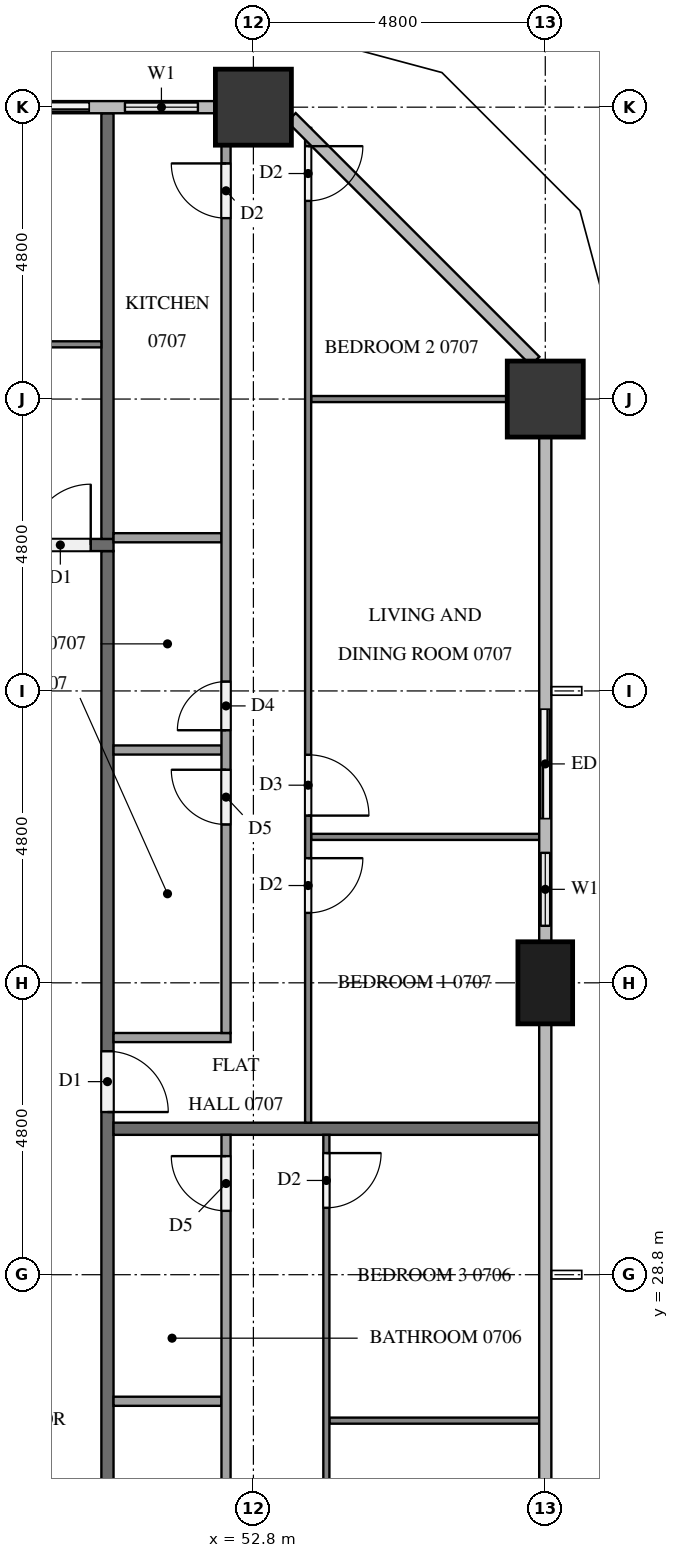
"""IFC4 building model, lengths in metres.
Left out: names, types, materials, properties, quantities, classifications, styles, units other than length and angle.
Written with IfcOpenShell. Run it as: python <this file> out.ifc"""

import sys

from ifc_helpers import new_model, si_unit, direction, frame, frame_2d, origin, origin_2d, place, context, subcontext, project, spatial, rectangle, extrude, element, fill, save


model = new_model("IFC4")
c1 = context("Model", 3, precision=1e-05, world=origin(), true_north=direction((0.0, 1.0)))
c2 = subcontext(c1, "Body", "Model", "MODEL_VIEW")
j1 = project(units=[si_unit("LENGTHUNIT", "METRE"), si_unit("PLANEANGLEUNIT", "RADIAN")], contexts=[c1])
p1 = place(None, origin())
s1 = spatial("IfcSite", under=j1, at=p1, CompositionType="ELEMENT")
p2 = place(p1, origin())
s2 = spatial("IfcBuilding", under=s1, at=p2, CompositionType="ELEMENT")
p3 = place(p2, frame((0.0, 0.0, 32.9)))
s3 = spatial("IfcBuildingStorey", under=s2, at=p3, CompositionType="ELEMENT", Elevation=32.9)
p4 = place(p3, frame((57.6, 33.6, 0.0), z_axis=(0.0, 0.0, 1.0), x_axis=(0.0, 1.0, 0.0)))
e1 = element("IfcColumn", 1, at=p4, inside=s3, PredefinedType="COLUMN", context=c2, shape_type="SweptSolid", body=[
    extrude(rectangle(XDim=1.35, YDim=0.9, at=origin_2d()), origin(), (0.0, 0.0, 1.0), 3.2),
])
for number, where, z_axis, x_axis in (
    (2, (57.6, 43.2, 0.0), (0.0, 0.0, 1.0), (1.0, 0.0, 0.0)),
    (3, (52.8, 48.0, 0.0), (0.0, 0.0, 1.0), (1.0, 0.0, 0.0)),
):
    element("IfcColumn", number, at=place(p3, frame(where, z_axis=z_axis, x_axis=x_axis)), inside=s3, PredefinedType="COLUMN", context=c2, shape_type="SweptSolid", body=[
        extrude(rectangle(XDim=1.25, YDim=1.25, at=origin_2d()), origin(), (0.0, 0.0, 1.0), 3.2),
    ])
p5 = place(p3, frame((57.6, 34.275, 0.0), z_axis=(0.0, 0.0, 1.0), x_axis=(0.0, 1.0, 0.0)))
e4 = element("IfcWall", 4, at=p5, inside=s3, PredefinedType="SOLIDWALL", context=c2, shape_type="SweptSolid", body=[
    extrude(rectangle(XDim=4.125, YDim=0.15, at=frame_2d((2.062, 0.0))), origin(), (0.0, 0.0, 1.0), 3.2),
])
p6 = place(p5, frame((0.262, 0.0, 0.9)))
e5 = element("IfcOpeningElement", 5, at=p6, cuts=e4, PredefinedType="OPENING", context=c2, shape_type="SweptSolid", body=[
    extrude(rectangle(XDim=1.2, YDim=1.4, at=frame_2d((0.6, 0.7))), frame((0.0, 0.085, 0.0), z_axis=(0.0, -1.0, 0.0), x_axis=(1.0, 0.0, 0.0)), (0.0, 0.0, 1.0), 0.17),
])
p7 = place(p5, frame((2.025, 0.0, 0.0)))
e6 = element("IfcOpeningElement", 6, at=p7, cuts=e4, PredefinedType="OPENING", context=c2, shape_type="SweptSolid", body=[
    extrude(rectangle(XDim=1.8, YDim=2.4, at=frame_2d((0.9, 1.2))), frame((0.0, 0.085, 0.0), z_axis=(0.0, -1.0, 0.0), x_axis=(1.0, 0.0, 0.0)), (0.0, 0.0, 1.0), 0.17),
])
p8 = place(p3, frame((52.175, 48.0, 0.0), z_axis=(0.0, 0.0, 1.0), x_axis=(-1.0, 0.0, 0.0)))
e7 = element("IfcWall", 7, at=p8, inside=s3, PredefinedType="SOLIDWALL", context=c2, shape_type="SweptSolid", body=[
    extrude(rectangle(XDim=4.175, YDim=0.15, at=frame_2d((2.087, 0.0))), origin(), (0.0, 0.0, 1.0), 3.2),
])
p9 = place(p8, frame((0.288, 0.0, 0.9)))
e8 = element("IfcOpeningElement", 8, at=p9, cuts=e7, PredefinedType="OPENING", context=c2, shape_type="SweptSolid", body=[
    extrude(rectangle(XDim=1.2, YDim=1.4, at=frame_2d((0.6, 0.7))), frame((0.0, 0.085, 0.0), z_axis=(0.0, -1.0, 0.0), x_axis=(1.0, 0.0, 0.0)), (0.0, 0.0, 1.0), 0.17),
])
p10 = place(p8, frame((2.075, 0.0, 0.0)))
e9 = element("IfcOpeningElement", 9, at=p10, cuts=e7, PredefinedType="OPENING", context=c2, shape_type="SweptSolid", body=[
    extrude(rectangle(XDim=1.8, YDim=2.4, at=frame_2d((0.9, 1.2))), frame((0.0, 0.085, 0.0), z_axis=(0.0, -1.0, 0.0), x_axis=(1.0, 0.0, 0.0)), (0.0, 0.0, 1.0), 0.17),
])
p11 = place(p3, frame((50.4, 40.7, 0.0), z_axis=(0.0, 0.0, 1.0), x_axis=(0.0, -1.0, 0.0)))
e10 = element("IfcWall", 10, at=p11, inside=s3, PredefinedType="PARTITIONING", context=c2, shape_type="SweptSolid", body=[
    extrude(rectangle(XDim=28.6, YDim=0.2, at=frame_2d((14.3, 0.0))), origin(), (0.0, 0.0, 1.0), 3.2),
])
p12 = place(p11, frame((27.375, 0.0, 0.0)))
e11 = element("IfcOpeningElement", 11, at=p12, cuts=e10, PredefinedType="OPENING", context=c2, shape_type="SweptSolid", body=[
    extrude(rectangle(XDim=1.1, YDim=2.1, at=frame_2d((0.55, 1.05))), frame((0.0, 0.11, 0.0), z_axis=(0.0, -1.0, 0.0), x_axis=(1.0, 0.0, 0.0)), (0.0, 0.0, 1.0), 0.22),
])
p13 = place(p11, frame((8.225, 0.0, 0.0)))
e12 = element("IfcOpeningElement", 12, at=p13, cuts=e10, PredefinedType="OPENING", context=c2, shape_type="SweptSolid", body=[
    extrude(rectangle(XDim=1.0, YDim=2.1, at=frame_2d((0.5, 1.05))), frame((0.0, 0.11, 0.0), z_axis=(0.0, -1.0, 0.0), x_axis=(1.0, 0.0, 0.0)), (0.0, 0.0, 1.0), 0.22),
])
p14 = place(p3, frame((11.9, 40.8, 0.0), z_axis=(0.0, 0.0, 1.0), x_axis=(1.0, 0.0, 0.0)))
e13 = element("IfcWall", 13, at=p14, inside=s3, PredefinedType="PARTITIONING", context=c2, shape_type="SweptSolid", body=[
    extrude(rectangle(XDim=38.6, YDim=0.2, at=frame_2d((19.3, 0.0))), origin(), (0.0, 0.0, 1.0), 3.2),
])
p15 = place(p14, frame((37.225, 0.0, 0.0)))
e14 = element("IfcOpeningElement", 14, at=p15, cuts=e13, PredefinedType="OPENING", context=c2, shape_type="SweptSolid", body=[
    extrude(rectangle(XDim=1.0, YDim=2.1, at=frame_2d((0.5, 1.05))), frame((0.0, 0.11, 0.0), z_axis=(0.0, -1.0, 0.0), x_axis=(1.0, 0.0, 0.0)), (0.0, 0.0, 1.0), 0.22),
])
p16 = place(p14, frame((30.025, 0.0, 0.0)))
e15 = element("IfcOpeningElement", 15, at=p16, cuts=e13, PredefinedType="OPENING", context=c2, shape_type="SweptSolid", body=[
    extrude(rectangle(XDim=1.0, YDim=2.1, at=frame_2d((0.5, 1.05))), frame((0.0, 0.11, 0.0), z_axis=(0.0, -1.0, 0.0), x_axis=(1.0, 0.0, 0.0)), (0.0, 0.0, 1.0), 0.22),
])
p17 = place(p14, frame((2.725, 0.0, 0.0)))
e16 = element("IfcOpeningElement", 16, at=p17, cuts=e13, PredefinedType="OPENING", context=c2, shape_type="SweptSolid", body=[
    extrude(rectangle(XDim=1.1, YDim=2.1, at=frame_2d((0.55, 1.05))), frame((0.0, 0.11, 0.0), z_axis=(0.0, -1.0, 0.0), x_axis=(1.0, 0.0, 0.0)), (0.0, 0.0, 1.0), 0.22),
])
p18 = place(p14, frame((1.225, 0.0, 0.0)))
e17 = element("IfcOpeningElement", 17, at=p18, cuts=e13, PredefinedType="OPENING", context=c2, shape_type="SweptSolid", body=[
    extrude(rectangle(XDim=1.0, YDim=2.1, at=frame_2d((0.5, 1.05))), frame((0.0, 0.11, 0.0), z_axis=(0.0, -1.0, 0.0), x_axis=(1.0, 0.0, 0.0)), (0.0, 0.0, 1.0), 0.22),
])
for number, where, z_axis, x_axis in (
    (18, (50.5, 31.2, 0.0), (0.0, 0.0, 1.0), (1.0, 0.0, 0.0)),
    (19, (50.4, 40.9, 0.0), (0.0, 0.0, 1.0), (0.0, 1.0, 0.0)),
):
    element("IfcWall", number, at=place(p3, frame(where, z_axis=z_axis, x_axis=x_axis)), inside=s3, PredefinedType="PARTITIONING", context=c2, shape_type="SweptSolid", body=[
        extrude(rectangle(XDim=7.0, YDim=0.2, at=frame_2d((3.5, 0.0))), origin(), (0.0, 0.0, 1.0), 3.2),
    ])
p19 = place(p3, frame((54.05, 26.4, 0.0), z_axis=(0.0, 0.0, 1.0), x_axis=(1.0, 0.0, 0.0)))
e20 = element("IfcWall", 20, at=p19, inside=s3, PredefinedType="PARTITIONING", context=c2, shape_type="SweptSolid", body=[
    extrude(rectangle(XDim=3.45, YDim=0.1, at=frame_2d((1.725, 0.0))), origin(), (0.0, 0.0, 1.0), 3.2),
])
p20 = place(p3, frame((54.0, 31.1, 0.0), z_axis=(0.0, 0.0, 1.0), x_axis=(0.0, -1.0, 0.0)))
e21 = element("IfcWall", 21, at=p20, inside=s3, PredefinedType="PARTITIONING", context=c2, shape_type="SweptSolid", body=[
    extrude(rectangle(XDim=19.0, YDim=0.1, at=frame_2d((9.5, 0.0))), origin(), (0.0, 0.0, 1.0), 3.2),
])
p21 = place(p20, frame((17.8, 0.0, 0.0)))
e22 = element("IfcOpeningElement", 22, at=p21, cuts=e21, PredefinedType="OPENING", context=c2, shape_type="SweptSolid", body=[
    extrude(rectangle(XDim=0.9, YDim=2.1, at=frame_2d((0.45, 1.05))), frame((0.0, 0.06, 0.0), z_axis=(0.0, -1.0, 0.0), x_axis=(1.0, 0.0, 0.0)), (0.0, 0.0, 1.0), 0.12),
])
p22 = place(p20, frame((9.85, 0.0, 0.0)))
e23 = element("IfcOpeningElement", 23, at=p22, cuts=e21, PredefinedType="OPENING", context=c2, shape_type="SweptSolid", body=[
    extrude(rectangle(XDim=0.9, YDim=2.1, at=frame_2d((0.45, 1.05))), frame((0.0, 0.06, 0.0), z_axis=(0.0, -1.0, 0.0), x_axis=(1.0, 0.0, 0.0)), (0.0, 0.0, 1.0), 0.12),
])
p23 = place(p20, frame((8.15, 0.0, 0.0)))
e24 = element("IfcOpeningElement", 24, at=p23, cuts=e21, PredefinedType="OPENING", context=c2, shape_type="SweptSolid", body=[
    extrude(rectangle(XDim=1.0, YDim=2.1, at=frame_2d((0.5, 1.05))), frame((0.0, 0.06, 0.0), z_axis=(0.0, -1.0, 0.0), x_axis=(1.0, 0.0, 0.0)), (0.0, 0.0, 1.0), 0.12),
])
p24 = place(p20, frame((0.3, 0.0, 0.0)))
e25 = element("IfcOpeningElement", 25, at=p24, cuts=e21, PredefinedType="OPENING", context=c2, shape_type="SweptSolid", body=[
    extrude(rectangle(XDim=0.9, YDim=2.1, at=frame_2d((0.45, 1.05))), frame((0.0, 0.06, 0.0), z_axis=(0.0, -1.0, 0.0), x_axis=(1.0, 0.0, 0.0)), (0.0, 0.0, 1.0), 0.12),
])
p25 = place(p3, frame((50.5, 26.719, 0.0), z_axis=(0.0, 0.0, 1.0), x_axis=(1.0, 0.0, 0.0)))
e26 = element("IfcWall", 26, at=p25, inside=s3, PredefinedType="PARTITIONING", context=c2, shape_type="SweptSolid", body=[
    extrude(rectangle(XDim=1.775, YDim=0.15, at=frame_2d((0.887, 0.0))), origin(), (0.0, 0.0, 1.0), 3.2),
])
p26 = place(p3, frame((52.35, 13.575, 0.0), z_axis=(0.0, 0.0, 1.0), x_axis=(0.0, 1.0, 0.0)))
e27 = element("IfcWall", 27, at=p26, inside=s3, PredefinedType="PARTITIONING", context=c2, shape_type="SweptSolid", body=[
    extrude(rectangle(XDim=17.525, YDim=0.15, at=frame_2d((8.763, 0.0))), origin(), (0.0, 0.0, 1.0), 3.2),
])
p27 = place(p26, frame((0.3, 0.0, 0.0)))
e28 = element("IfcOpeningElement", 28, at=p27, cuts=e27, PredefinedType="OPENING", context=c2, shape_type="SweptSolid", body=[
    extrude(rectangle(XDim=0.9, YDim=2.1, at=frame_2d((0.45, 1.05))), frame((0.0, 0.085, 0.0), z_axis=(0.0, -1.0, 0.0), x_axis=(1.0, 0.0, 0.0)), (0.0, 0.0, 1.0), 0.17),
])
p28 = place(p26, frame((8.733, 0.0, 0.0)))
e29 = element("IfcOpeningElement", 29, at=p28, cuts=e27, PredefinedType="OPENING", context=c2, shape_type="SweptSolid", body=[
    extrude(rectangle(XDim=0.8, YDim=2.1, at=frame_2d((0.4, 1.05))), frame((0.0, 0.085, 0.0), z_axis=(0.0, -1.0, 0.0), x_axis=(1.0, 0.0, 0.0)), (0.0, 0.0, 1.0), 0.17),
])
p29 = place(p26, frame((10.183, 0.0, 0.0)))
e30 = element("IfcOpeningElement", 30, at=p29, cuts=e27, PredefinedType="OPENING", context=c2, shape_type="SweptSolid", body=[
    extrude(rectangle(XDim=0.8, YDim=2.1, at=frame_2d((0.4, 1.05))), frame((0.0, 0.085, 0.0), z_axis=(0.0, -1.0, 0.0), x_axis=(1.0, 0.0, 0.0)), (0.0, 0.0, 1.0), 0.17),
])
p30 = place(p26, frame((16.275, 0.0, 0.0)))
e31 = element("IfcOpeningElement", 31, at=p30, cuts=e27, PredefinedType="OPENING", context=c2, shape_type="SweptSolid", body=[
    extrude(rectangle(XDim=0.9, YDim=2.1, at=frame_2d((0.45, 1.05))), frame((0.0, 0.085, 0.0), z_axis=(0.0, -1.0, 0.0), x_axis=(1.0, 0.0, 0.0)), (0.0, 0.0, 1.0), 0.17),
])
p31 = place(p3, frame((53.75, 36.0, 0.0), z_axis=(0.0, 0.0, 1.0), x_axis=(1.0, 0.0, 0.0)))
e32 = element("IfcWall", 32, at=p31, inside=s3, PredefinedType="PARTITIONING", context=c2, shape_type="SweptSolid", body=[
    extrude(rectangle(XDim=3.75, YDim=0.1, at=frame_2d((1.875, 0.0))), origin(), (0.0, 0.0, 1.0), 3.2),
])
p32 = place(p3, frame((53.75, 43.2, 0.0), z_axis=(0.0, 0.0, 1.0), x_axis=(1.0, 0.0, 0.0)))
e33 = element("IfcWall", 33, at=p32, inside=s3, PredefinedType="PARTITIONING", context=c2, shape_type="SweptSolid", body=[
    extrude(rectangle(XDim=3.225, YDim=0.1, at=frame_2d((1.613, 0.0))), origin(), (0.0, 0.0, 1.0), 3.2),
])
p33 = place(p3, frame((53.7, 47.659, 0.0), z_axis=(0.0, 0.0, 1.0), x_axis=(0.0, -1.0, 0.0)))
e34 = element("IfcWall", 34, at=p33, inside=s3, PredefinedType="PARTITIONING", context=c2, shape_type="SweptSolid", body=[
    extrude(rectangle(XDim=16.359, YDim=0.1, at=frame_2d((8.179, 0.0))), origin(), (0.0, 0.0, 1.0), 3.2),
])
p34 = place(p33, frame((12.009, 0.0, 0.0)))
e35 = element("IfcOpeningElement", 35, at=p34, cuts=e34, PredefinedType="OPENING", context=c2, shape_type="SweptSolid", body=[
    extrude(rectangle(XDim=0.9, YDim=2.1, at=frame_2d((0.45, 1.05))), frame((0.0, 0.06, 0.0), z_axis=(0.0, -1.0, 0.0), x_axis=(1.0, 0.0, 0.0)), (0.0, 0.0, 1.0), 0.12),
])
p35 = place(p33, frame((10.309, 0.0, 0.0)))
e36 = element("IfcOpeningElement", 36, at=p35, cuts=e34, PredefinedType="OPENING", context=c2, shape_type="SweptSolid", body=[
    extrude(rectangle(XDim=1.0, YDim=2.1, at=frame_2d((0.5, 1.05))), frame((0.0, 0.06, 0.0), z_axis=(0.0, -1.0, 0.0), x_axis=(1.0, 0.0, 0.0)), (0.0, 0.0, 1.0), 0.12),
])
p36 = place(p33, frame((0.3, 0.0, 0.0)))
e37 = element("IfcOpeningElement", 37, at=p36, cuts=e34, PredefinedType="OPENING", context=c2, shape_type="SweptSolid", body=[
    extrude(rectangle(XDim=0.9, YDim=2.1, at=frame_2d((0.45, 1.05))), frame((0.0, 0.06, 0.0), z_axis=(0.0, -1.0, 0.0), x_axis=(1.0, 0.0, 0.0)), (0.0, 0.0, 1.0), 0.12),
])
for number, where, z_axis, x_axis in (
    (38, (50.5, 37.429, 0.0), (0.0, 0.0, 1.0), (1.0, 0.0, 0.0)),
    (39, (50.5, 40.919, 0.0), (0.0, 0.0, 1.0), (1.0, 0.0, 0.0)),
):
    element("IfcWall", number, at=place(p3, frame(where, z_axis=z_axis, x_axis=x_axis)), inside=s3, PredefinedType="PARTITIONING", context=c2, shape_type="SweptSolid", body=[
        extrude(rectangle(XDim=1.775, YDim=0.15, at=frame_2d((0.887, 0.0))), origin(), (0.0, 0.0, 1.0), 3.2),
    ])
p37 = place(p3, frame((50.5, 32.7, 0.0), z_axis=(0.0, 0.0, 1.0), x_axis=(1.0, 0.0, 0.0)))
e40 = element("IfcWall", 40, at=p37, inside=s3, PredefinedType="PARTITIONING", context=c2, shape_type="SweptSolid", body=[
    extrude(rectangle(XDim=1.925, YDim=0.15, at=frame_2d((0.962, 0.0))), origin(), (0.0, 0.0, 1.0), 3.2),
])
p38 = place(p3, frame((52.35, 32.775, 0.0), z_axis=(0.0, 0.0, 1.0), x_axis=(0.0, 1.0, 0.0)))
e41 = element("IfcWall", 41, at=p38, inside=s3, PredefinedType="PARTITIONING", context=c2, shape_type="SweptSolid", body=[
    extrude(rectangle(XDim=14.6, YDim=0.15, at=frame_2d((7.3, 0.0))), origin(), (0.0, 0.0, 1.0), 3.2),
])
p39 = place(p38, frame((3.429, 0.0, 0.0)))
e42 = element("IfcOpeningElement", 42, at=p39, cuts=e41, PredefinedType="OPENING", context=c2, shape_type="SweptSolid", body=[
    extrude(rectangle(XDim=0.9, YDim=2.1, at=frame_2d((0.45, 1.05))), frame((0.0, 0.085, 0.0), z_axis=(0.0, -1.0, 0.0), x_axis=(1.0, 0.0, 0.0)), (0.0, 0.0, 1.0), 0.17),
])
p40 = place(p38, frame((4.979, 0.0, 0.0)))
e43 = element("IfcOpeningElement", 43, at=p40, cuts=e41, PredefinedType="OPENING", context=c2, shape_type="SweptSolid", body=[
    extrude(rectangle(XDim=0.8, YDim=2.1, at=frame_2d((0.4, 1.05))), frame((0.0, 0.085, 0.0), z_axis=(0.0, -1.0, 0.0), x_axis=(1.0, 0.0, 0.0)), (0.0, 0.0, 1.0), 0.17),
])
p41 = place(p38, frame((13.4, 0.0, 0.0)))
e44 = element("IfcOpeningElement", 44, at=p41, cuts=e41, PredefinedType="OPENING", context=c2, shape_type="SweptSolid", body=[
    extrude(rectangle(XDim=0.9, YDim=2.1, at=frame_2d((0.45, 1.05))), frame((0.0, 0.085, 0.0), z_axis=(0.0, -1.0, 0.0), x_axis=(1.0, 0.0, 0.0)), (0.0, 0.0, 1.0), 0.17),
])
p42 = place(p3, frame((43.3, 44.1, 0.0), z_axis=(0.0, 0.0, 1.0), x_axis=(1.0, 0.0, 0.0)))
e45 = element("IfcWall", 45, at=p42, inside=s3, PredefinedType="PARTITIONING", context=c2, shape_type="SweptSolid", body=[
    extrude(rectangle(XDim=7.0, YDim=0.1, at=frame_2d((3.5, 0.0))), origin(), (0.0, 0.0, 1.0), 3.2),
])
p43 = place(p42, frame((0.3, 0.0, 0.0)))
e46 = element("IfcOpeningElement", 46, at=p43, cuts=e45, PredefinedType="OPENING", context=c2, shape_type="SweptSolid", body=[
    extrude(rectangle(XDim=1.0, YDim=2.1, at=frame_2d((0.5, 1.05))), frame((0.0, 0.06, 0.0), z_axis=(0.0, -1.0, 0.0), x_axis=(1.0, 0.0, 0.0)), (0.0, 0.0, 1.0), 0.12),
])
p44 = place(p6, origin())
e47 = element("IfcWindow", 47, at=p44, inside=s3, PartitioningType="SINGLE_PANEL", PredefinedType="WINDOW", context=c2, shape_type="SweptSolid", body=[
    extrude(rectangle(XDim=1.2, YDim=1.4, at=frame_2d((0.6, 0.7))), frame((0.0, 0.03, 0.0), z_axis=(0.0, -1.0, 0.0), x_axis=(1.0, 0.0, 0.0)), (0.0, 0.0, 1.0), 0.06),
])
fill(e5, e47)
p45 = place(p7, origin())
e48 = element("IfcDoor", 48, at=p45, inside=s3, OperationType="SLIDING_TO_RIGHT", PredefinedType="DOOR", context=c2, shape_type="SweptSolid", body=[
    extrude(rectangle(XDim=1.8, YDim=2.4, at=frame_2d((0.9, 1.2))), frame((0.0, 0.025, 0.0), z_axis=(0.0, -1.0, 0.0), x_axis=(1.0, 0.0, 0.0)), (0.0, 0.0, 1.0), 0.05),
])
fill(e6, e48)
p46 = place(p9, origin())
e49 = element("IfcWindow", 49, at=p46, inside=s3, PartitioningType="SINGLE_PANEL", PredefinedType="WINDOW", context=c2, shape_type="SweptSolid", body=[
    extrude(rectangle(XDim=1.2, YDim=1.4, at=frame_2d((0.6, 0.7))), frame((0.0, 0.03, 0.0), z_axis=(0.0, -1.0, 0.0), x_axis=(1.0, 0.0, 0.0)), (0.0, 0.0, 1.0), 0.06),
])
fill(e8, e49)
p47 = place(p10, origin())
e50 = element("IfcDoor", 50, at=p47, inside=s3, OperationType="SLIDING_TO_LEFT", PredefinedType="DOOR", context=c2, shape_type="SweptSolid", body=[
    extrude(rectangle(XDim=1.8, YDim=2.4, at=frame_2d((0.9, 1.2))), frame((0.0, 0.025, 0.0), z_axis=(0.0, -1.0, 0.0), x_axis=(1.0, 0.0, 0.0)), (0.0, 0.0, 1.0), 0.05),
])
fill(e9, e50)
p48 = place(p13, origin())
e51 = element("IfcDoor", 51, at=p48, inside=s3, OperationType="SINGLE_SWING_RIGHT", PredefinedType="DOOR", context=c2, shape_type="SweptSolid", body=[
    extrude(rectangle(XDim=1.0, YDim=2.1, at=frame_2d((0.5, 1.05))), frame((0.0, 0.025, 0.0), z_axis=(0.0, -1.0, 0.0), x_axis=(1.0, 0.0, 0.0)), (0.0, 0.0, 1.0), 0.05),
])
fill(e12, e51)
p49 = place(p15, origin())
e52 = element("IfcDoor", 52, at=p49, inside=s3, OperationType="SINGLE_SWING_RIGHT", PredefinedType="DOOR", context=c2, shape_type="SweptSolid", body=[
    extrude(rectangle(XDim=1.0, YDim=2.1, at=frame_2d((0.5, 1.05))), frame((0.0, 0.025, 0.0), z_axis=(0.0, -1.0, 0.0), x_axis=(1.0, 0.0, 0.0)), (0.0, 0.0, 1.0), 0.05),
])
fill(e14, e52)
p50 = place(p24, origin())
e53 = element("IfcDoor", 53, at=p50, inside=s3, OperationType="SINGLE_SWING_LEFT", PredefinedType="DOOR", context=c2, shape_type="SweptSolid", body=[
    extrude(rectangle(XDim=0.9, YDim=2.1, at=frame_2d((0.45, 1.05))), frame((0.0, 0.025, 0.0), z_axis=(0.0, -1.0, 0.0), x_axis=(1.0, 0.0, 0.0)), (0.0, 0.0, 1.0), 0.05),
])
fill(e25, e53)
p51 = place(p30, origin())
e54 = element("IfcDoor", 54, at=p51, inside=s3, OperationType="SINGLE_SWING_RIGHT", PredefinedType="DOOR", context=c2, shape_type="SweptSolid", body=[
    extrude(rectangle(XDim=0.9, YDim=2.1, at=frame_2d((0.45, 1.05))), frame((0.0, 0.025, 0.0), z_axis=(0.0, -1.0, 0.0), x_axis=(1.0, 0.0, 0.0)), (0.0, 0.0, 1.0), 0.05),
])
fill(e31, e54)
p52 = place(p34, origin())
e55 = element("IfcDoor", 55, at=p52, inside=s3, OperationType="SINGLE_SWING_LEFT", PredefinedType="DOOR", context=c2, shape_type="SweptSolid", body=[
    extrude(rectangle(XDim=0.9, YDim=2.1, at=frame_2d((0.45, 1.05))), frame((0.0, 0.025, 0.0), z_axis=(0.0, -1.0, 0.0), x_axis=(1.0, 0.0, 0.0)), (0.0, 0.0, 1.0), 0.05),
])
fill(e35, e55)
p53 = place(p35, origin())
e56 = element("IfcDoor", 56, at=p53, inside=s3, OperationType="SINGLE_SWING_RIGHT", PredefinedType="DOOR", context=c2, shape_type="SweptSolid", body=[
    extrude(rectangle(XDim=1.0, YDim=2.1, at=frame_2d((0.5, 1.05))), frame((0.0, 0.025, 0.0), z_axis=(0.0, -1.0, 0.0), x_axis=(1.0, 0.0, 0.0)), (0.0, 0.0, 1.0), 0.05),
])
fill(e36, e56)
p54 = place(p36, origin())
e57 = element("IfcDoor", 57, at=p54, inside=s3, OperationType="SINGLE_SWING_LEFT", PredefinedType="DOOR", context=c2, shape_type="SweptSolid", body=[
    extrude(rectangle(XDim=0.9, YDim=2.1, at=frame_2d((0.45, 1.05))), frame((0.0, 0.025, 0.0), z_axis=(0.0, -1.0, 0.0), x_axis=(1.0, 0.0, 0.0)), (0.0, 0.0, 1.0), 0.05),
])
fill(e37, e57)
p55 = place(p39, origin())
e58 = element("IfcDoor", 58, at=p55, inside=s3, OperationType="SINGLE_SWING_RIGHT", PredefinedType="DOOR", context=c2, shape_type="SweptSolid", body=[
    extrude(rectangle(XDim=0.9, YDim=2.1, at=frame_2d((0.45, 1.05))), frame((0.0, 0.025, 0.0), z_axis=(0.0, -1.0, 0.0), x_axis=(1.0, 0.0, 0.0)), (0.0, 0.0, 1.0), 0.05),
])
fill(e42, e58)
p56 = place(p40, origin())
e59 = element("IfcDoor", 59, at=p56, inside=s3, OperationType="SINGLE_SWING_LEFT", PredefinedType="DOOR", context=c2, shape_type="SweptSolid", body=[
    extrude(rectangle(XDim=0.8, YDim=2.1, at=frame_2d((0.4, 1.05))), frame((0.0, 0.025, 0.0), z_axis=(0.0, -1.0, 0.0), x_axis=(1.0, 0.0, 0.0)), (0.0, 0.0, 1.0), 0.05),
])
fill(e43, e59)
p57 = place(p41, origin())
e60 = element("IfcDoor", 60, at=p57, inside=s3, OperationType="SINGLE_SWING_RIGHT", PredefinedType="DOOR", context=c2, shape_type="SweptSolid", body=[
    extrude(rectangle(XDim=0.9, YDim=2.1, at=frame_2d((0.45, 1.05))), frame((0.0, 0.025, 0.0), z_axis=(0.0, -1.0, 0.0), x_axis=(1.0, 0.0, 0.0)), (0.0, 0.0, 1.0), 0.05),
])
fill(e44, e60)
save(model, sys.argv[1])
